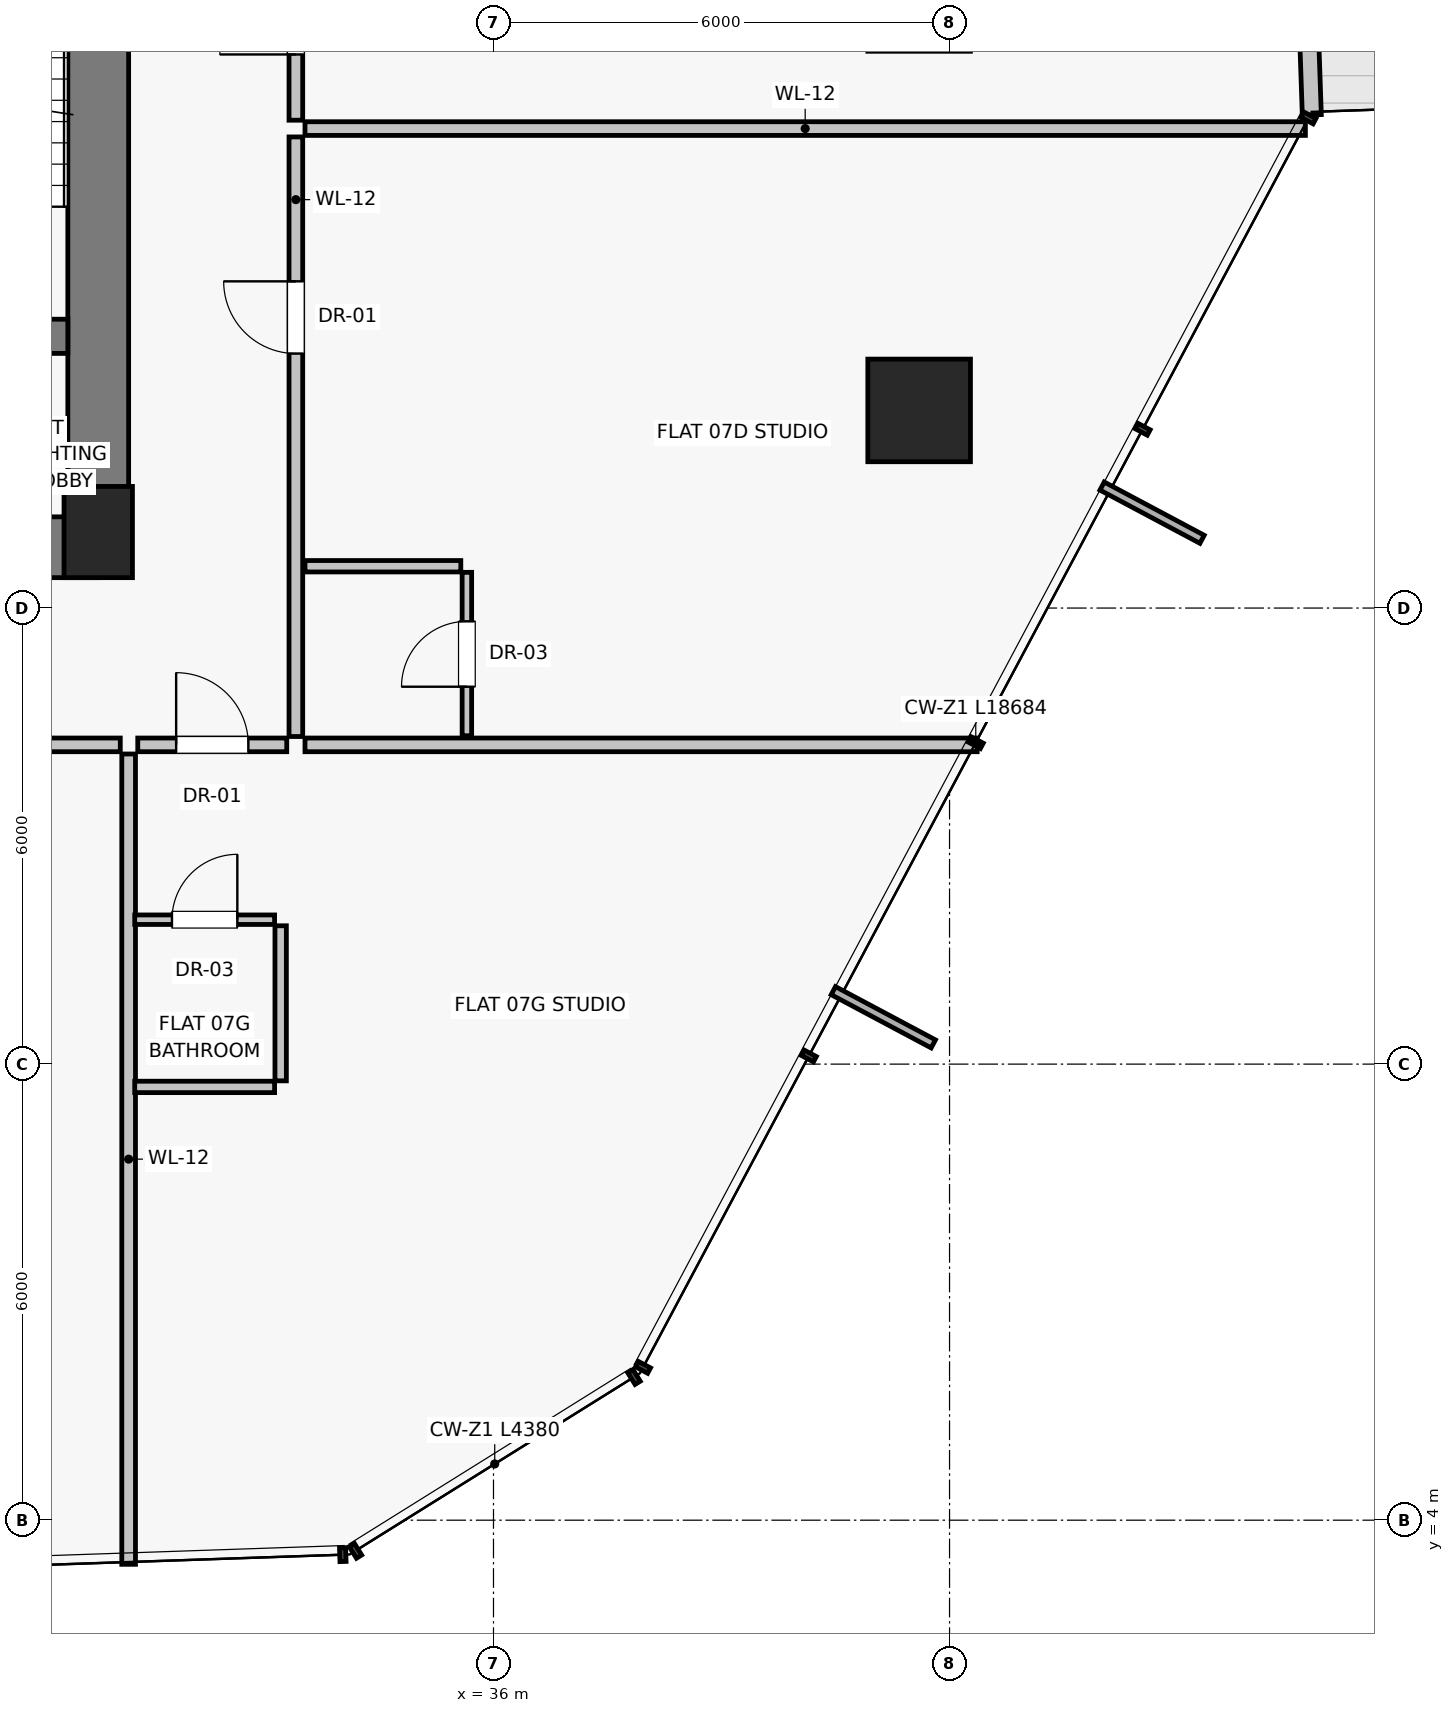
"""IFC4 building model, lengths in metres.
Left out: names, types, materials, properties, quantities, classifications, styles, units other than length and angle.
Written with IfcOpenShell. Run it as: python <this file> out.ifc"""

import sys

from ifc_helpers import new_model, si_unit, direction, frame, frame_2d, origin, origin_2d, place, context, subcontext, project, spatial, rectangle, extrude, source, transform, mapped, element, fill, save


model = new_model("IFC4")
c1 = context("Model", 3, precision=1e-05, world=origin(), true_north=direction((0.0, 1.0)))
c2 = subcontext(c1, "Body", "Model", "MODEL_VIEW")
j1 = project(units=[si_unit("LENGTHUNIT", "METRE"), si_unit("PLANEANGLEUNIT", "RADIAN")], contexts=[c1])
p1 = place(None, origin())
s1 = spatial("IfcSite", under=j1, at=p1, CompositionType="ELEMENT")
p2 = place(p1, origin())
s2 = spatial("IfcBuilding", under=s1, at=p2, CompositionType="ELEMENT")
p3 = place(p2, frame((0.0, 0.0, 30.55)))
s3 = spatial("IfcBuildingStorey", under=s2, at=p3, CompositionType="ELEMENT", Elevation=30.55)
p4 = place(p3, frame((30.8, 17.0, 0.0), z_axis=(0.0, 0.0, 1.0), x_axis=(1.0, 0.0, 0.0)))
e1 = element("IfcColumn", 1, at=p4, inside=s3, PredefinedType="PILASTER", context=c2, shape_type="SweptSolid", body=[
    extrude(rectangle(XDim=0.9, YDim=1.2, at=origin_2d()), origin(), (0.0, 0.0, 1.0), 3.25),
])
p5 = place(p3, frame((41.6, 18.6, 0.0), z_axis=(0.0, 0.0, 1.0), x_axis=(1.0, 0.0, 0.0)))
e2 = element("IfcColumn", 2, at=p5, inside=s3, PredefinedType="COLUMN", context=c2, shape_type="SweptSolid", body=[
    extrude(rectangle(XDim=1.35, YDim=1.35, at=origin_2d()), origin(), (0.0, 0.0, 1.0), 3.25),
])
p6 = place(p3, frame((46.766, 22.488, 0.0), z_axis=(0.0, 0.0, 1.0), x_axis=(-0.03422176955, 0.999414263701, 0.0)))
e3 = element("IfcWall", 3, at=p6, inside=s3, PredefinedType="SOLIDWALL", context=c2, shape_type="SweptSolid", body=[
    extrude(rectangle(XDim=4.58, YDim=0.25, at=frame_2d((2.29, 0.0))), origin(), (0.0, 0.0, 1.0), 3.0),
])
p7 = place(p6, frame((0.91, 0.0, 0.0)))
e4 = element("IfcOpeningElement", 4, at=p7, cuts=e3, PredefinedType="OPENING", context=c2, shape_type="SweptSolid", body=[
    extrude(rectangle(XDim=1.15, YDim=2.25, at=frame_2d((0.575, 1.125))), frame((0.0, 0.135, 0.0), z_axis=(0.0, -1.0, 0.0), x_axis=(1.0, 0.0, 0.0)), (0.0, 0.0, 1.0), 0.27),
])
p8 = place(p3, frame((30.8, 16.8, 0.0), z_axis=(0.0, 0.0, 1.0), x_axis=(0.0, 1.0, 0.0)))
e5 = element("IfcWall", 5, at=p8, inside=s3, PredefinedType="SHEAR", context=c2, shape_type="SweptSolid", body=[
    extrude(rectangle(XDim=14.2, YDim=0.8, at=frame_2d((7.1, 0.0))), origin(), (0.0, 0.0, 1.0), 3.0),
])
p9 = place(p3, frame((24.95, 16.8, 0.0), z_axis=(0.0, 0.0, 1.0), x_axis=(1.0, 0.0, 0.0)))
e6 = element("IfcWall", 6, at=p9, inside=s3, PredefinedType="SHEAR", context=c2, shape_type="SweptSolid", body=[
    extrude(rectangle(XDim=5.85, YDim=0.8, at=frame_2d((2.925, 0.0))), origin(), (0.0, 0.0, 1.0), 3.0),
])
p10 = place(p9, frame((2.15, 0.0, 0.0)))
e7 = element("IfcOpeningElement", 7, at=p10, cuts=e6, PredefinedType="OPENING", context=c2, shape_type="SweptSolid", body=[
    extrude(rectangle(XDim=1.2, YDim=2.03, at=frame_2d((0.6, 1.015))), frame((0.0, 0.41, 0.0), z_axis=(0.0, -1.0, 0.0), x_axis=(1.0, 0.0, 0.0)), (0.0, 0.0, 1.0), 0.82),
])
p11 = place(p3, frame((26.975, 19.575, 0.0), z_axis=(0.0, 0.0, 1.0), x_axis=(1.0, 0.0, 0.0)))
e8 = element("IfcWall", 8, at=p11, inside=s3, PredefinedType="SHEAR", context=c2, shape_type="SweptSolid", body=[
    extrude(rectangle(XDim=3.425, YDim=0.45, at=frame_2d((1.712, 0.0))), origin(), (0.0, 0.0, 1.0), 3.0),
])
p12 = place(p11, frame((1.05, 0.0, 0.0)))
e9 = element("IfcOpeningElement", 9, at=p12, cuts=e8, PredefinedType="OPENING", context=c2, shape_type="SweptSolid", body=[
    extrude(rectangle(XDim=1.1, YDim=2.03, at=frame_2d((0.55, 1.015))), frame((0.0, 0.235, 0.0), z_axis=(0.0, -1.0, 0.0), x_axis=(1.0, 0.0, 0.0)), (0.0, 0.0, 1.0), 0.47),
])
p13 = place(p3, frame((31.2, 14.08, 0.0), z_axis=(0.0, 0.0, 1.0), x_axis=(0.0, -1.0, 0.0)))
e10 = element("IfcWall", 10, at=p13, inside=s3, PredefinedType="PARTITIONING", context=c2, shape_type="SweptSolid", body=[
    extrude(rectangle(XDim=10.66, YDim=0.18, at=frame_2d((5.33, 0.0))), origin(), (0.0, 0.0, 1.0), 3.0),
])
p14 = place(p3, frame((25.118, 14.2, 0.0), z_axis=(0.0, 0.0, 1.0), x_axis=(1.0, 0.0, 0.0)))
e11 = element("IfcWall", 11, at=p14, inside=s3, PredefinedType="PARTITIONING", context=c2, shape_type="SweptSolid", body=[
    extrude(rectangle(XDim=5.972, YDim=0.18, at=frame_2d((2.986, 0.0))), origin(), (0.0, 0.0, 1.0), 3.0),
])
p15 = place(p14, frame((3.62, 0.0, 0.0)))
e12 = element("IfcOpeningElement", 12, at=p15, cuts=e11, PredefinedType="OPENING", context=c2, shape_type="SweptSolid", body=[
    extrude(rectangle(XDim=0.95, YDim=2.02, at=frame_2d((0.475, 1.01))), frame((0.0, 0.1, 0.0), z_axis=(0.0, -1.0, 0.0), x_axis=(1.0, 0.0, 0.0)), (0.0, 0.0, 1.0), 0.2),
])
p16 = place(p3, frame((33.52, 14.2, 0.0), z_axis=(0.0, 0.0, 1.0), x_axis=(1.0, 0.0, 0.0)))
e13 = element("IfcWall", 13, at=p16, inside=s3, PredefinedType="PARTITIONING", context=c2, shape_type="SweptSolid", body=[
    extrude(rectangle(XDim=8.843, YDim=0.18, at=frame_2d((4.422, 0.0))), origin(), (0.0, 0.0, 1.0), 3.0),
])
p17 = place(p3, frame((33.4, 22.418, 0.0), z_axis=(0.0, 0.0, 1.0), x_axis=(0.0, 1.0, 0.0)))
e14 = element("IfcWall", 14, at=p17, inside=s3, PredefinedType="PARTITIONING", context=c2, shape_type="SweptSolid", body=[
    extrude(rectangle(XDim=2.73, YDim=0.18, at=frame_2d((1.365, 0.0))), origin(), (0.0, 0.0, 1.0), 3.0),
])
p18 = place(p17, frame((0.865, 0.0, 0.0)))
e15 = element("IfcOpeningElement", 15, at=p18, cuts=e14, PredefinedType="OPENING", context=c2, shape_type="SweptSolid", body=[
    extrude(rectangle(XDim=1.0, YDim=2.01, at=frame_2d((0.5, 1.005))), frame((0.0, 0.1, 0.0), z_axis=(0.0, -1.0, 0.0), x_axis=(1.0, 0.0, 0.0)), (0.0, 0.0, 1.0), 0.2),
])
p19 = place(p3, frame((33.52, 22.308, 0.0), z_axis=(0.0, 0.0, 1.0), x_axis=(1.0, 0.0, 0.0)))
e16 = element("IfcWall", 16, at=p19, inside=s3, PredefinedType="PARTITIONING", context=c2, shape_type="SweptSolid", body=[
    extrude(rectangle(XDim=13.162, YDim=0.18, at=frame_2d((6.581, 0.0))), origin(), (0.0, 0.0, 1.0), 3.0),
])
p20 = place(p3, frame((33.4, 14.31, 0.0), z_axis=(0.0, 0.0, 1.0), x_axis=(0.0, 1.0, 0.0)))
e17 = element("IfcWall", 17, at=p20, inside=s3, PredefinedType="PARTITIONING", context=c2, shape_type="SweptSolid", body=[
    extrude(rectangle(XDim=7.888, YDim=0.18, at=frame_2d((3.944, 0.0))), origin(), (0.0, 0.0, 1.0), 3.0),
])
p21 = place(p20, frame((5.038, 0.0, 0.0)))
e18 = element("IfcOpeningElement", 18, at=p21, cuts=e17, PredefinedType="OPENING", context=c2, shape_type="SweptSolid", body=[
    extrude(rectangle(XDim=0.95, YDim=2.02, at=frame_2d((0.475, 1.01))), frame((0.0, 0.1, 0.0), z_axis=(0.0, -1.0, 0.0), x_axis=(1.0, 0.0, 0.0)), (0.0, 0.0, 1.0), 0.2),
])
p22 = place(p3, frame((33.52, 16.55, 0.0), z_axis=(0.0, 0.0, 1.0), x_axis=(1.0, 0.0, 0.0)))
e19 = element("IfcWall", 19, at=p22, inside=s3, PredefinedType="PARTITIONING", context=c2, shape_type="SweptSolid", body=[
    extrude(rectangle(XDim=2.05, YDim=0.15, at=frame_2d((1.025, 0.0))), origin(), (0.0, 0.0, 1.0), 3.0),
])
p23 = place(p3, frame((35.65, 14.32, 0.0), z_axis=(0.0, 0.0, 1.0), x_axis=(0.0, 1.0, 0.0)))
e20 = element("IfcWall", 20, at=p23, inside=s3, PredefinedType="PARTITIONING", context=c2, shape_type="SweptSolid", body=[
    extrude(rectangle(XDim=2.15, YDim=0.125, at=frame_2d((1.075, 0.0))), origin(), (0.0, 0.0, 1.0), 3.0),
])
p24 = place(p23, frame((0.645, 0.0, 0.0)))
e21 = element("IfcOpeningElement", 21, at=p24, cuts=e20, PredefinedType="OPENING", context=c2, shape_type="SweptSolid", body=[
    extrude(rectangle(XDim=0.86, YDim=2.01, at=frame_2d((0.43, 1.005))), frame((0.0, 0.073, 0.0), z_axis=(0.0, -1.0, 0.0), x_axis=(1.0, 0.0, 0.0)), (0.0, 0.0, 1.0), 0.145),
])
p25 = place(p3, frame((31.32, 14.2, 0.0), z_axis=(0.0, 0.0, 1.0), x_axis=(1.0, 0.0, 0.0)))
e22 = element("IfcWall", 22, at=p25, inside=s3, PredefinedType="PARTITIONING", context=c2, shape_type="SweptSolid", body=[
    extrude(rectangle(XDim=1.96, YDim=0.18, at=frame_2d((0.98, 0.0))), origin(), (0.0, 0.0, 1.0), 3.0),
])
p26 = place(p25, frame((0.505, 0.0, 0.0)))
e23 = element("IfcOpeningElement", 23, at=p26, cuts=e22, PredefinedType="OPENING", context=c2, shape_type="SweptSolid", body=[
    extrude(rectangle(XDim=0.95, YDim=2.02, at=frame_2d((0.475, 1.01))), frame((0.0, 0.1, 0.0), z_axis=(0.0, -1.0, 0.0), x_axis=(1.0, 0.0, 0.0)), (0.0, 0.0, 1.0), 0.2),
])
p27 = place(p3, frame((31.28, 11.9, 0.0), z_axis=(0.0, 0.0, 1.0), x_axis=(1.0, 0.0, 0.0)))
e24 = element("IfcWall", 24, at=p27, inside=s3, PredefinedType="PARTITIONING", context=c2, shape_type="SweptSolid", body=[
    extrude(rectangle(XDim=1.84, YDim=0.125, at=frame_2d((0.92, 0.0))), origin(), (0.0, 0.0, 1.0), 3.0),
])
p28 = place(p27, frame((0.49, 0.0, 0.0)))
e25 = element("IfcOpeningElement", 25, at=p28, cuts=e24, PredefinedType="OPENING", context=c2, shape_type="SweptSolid", body=[
    extrude(rectangle(XDim=0.86, YDim=2.01, at=frame_2d((0.43, 1.005))), frame((0.0, 0.073, 0.0), z_axis=(0.0, -1.0, 0.0), x_axis=(1.0, 0.0, 0.0)), (0.0, 0.0, 1.0), 0.145),
])
p29 = place(p3, frame((31.28, 9.7, 0.0), z_axis=(0.0, 0.0, 1.0), x_axis=(1.0, 0.0, 0.0)))
e26 = element("IfcWall", 26, at=p29, inside=s3, PredefinedType="PARTITIONING", context=c2, shape_type="SweptSolid", body=[
    extrude(rectangle(XDim=1.84, YDim=0.15, at=frame_2d((0.92, 0.0))), origin(), (0.0, 0.0, 1.0), 3.0),
])
p30 = place(p3, frame((33.2, 9.78, 0.0), z_axis=(0.0, 0.0, 1.0), x_axis=(0.0, 1.0, 0.0)))
e27 = element("IfcWall", 27, at=p30, inside=s3, PredefinedType="PARTITIONING", context=c2, shape_type="SweptSolid", body=[
    extrude(rectangle(XDim=2.04, YDim=0.15, at=frame_2d((1.02, 0.0))), origin(), (0.0, 0.0, 1.0), 3.0),
])
m1 = source(origin(), c2, "Body", "SweptSolid", [
    extrude(rectangle(XDim=1.0, YDim=2.01, at=frame_2d((0.5, 1.005))), frame((0.0, 0.025, 0.0), z_axis=(0.0, -1.0, 0.0), x_axis=(1.0, 0.0, 0.0)), (0.0, 0.0, 1.0), 0.05),
])
p31 = place(p18, origin())
e28 = element("IfcDoor", 28, at=p31, inside=s3, OperationType="SINGLE_SWING_LEFT", PredefinedType="DOOR", context=c2, shape_type="MappedRepresentation", body=[
    mapped(m1, transform((0.0, 0.0, 0.0), scale=1.0)),
])
fill(e15, e28)
m2 = source(origin(), c2, "Body", "SweptSolid", [
    extrude(rectangle(XDim=0.95, YDim=2.02, at=frame_2d((0.475, 1.01))), frame((0.0, 0.025, 0.0), z_axis=(0.0, -1.0, 0.0), x_axis=(1.0, 0.0, 0.0)), (0.0, 0.0, 1.0), 0.05),
])
p32 = place(p21, origin())
e29 = element("IfcDoor", 29, at=p32, inside=s3, OperationType="SINGLE_SWING_RIGHT", PredefinedType="DOOR", context=c2, shape_type="MappedRepresentation", body=[
    mapped(m2, transform((0.0, 0.0, 0.0), scale=1.0)),
])
fill(e18, e29)
m3 = source(origin(), c2, "Body", "SweptSolid", [
    extrude(rectangle(XDim=0.86, YDim=2.01, at=frame_2d((0.43, 1.005))), frame((0.0, 0.025, 0.0), z_axis=(0.0, -1.0, 0.0), x_axis=(1.0, 0.0, 0.0)), (0.0, 0.0, 1.0), 0.05),
])
p33 = place(p24, origin())
e30 = element("IfcDoor", 30, at=p33, inside=s3, OperationType="SINGLE_SWING_LEFT", PredefinedType="DOOR", context=c2, shape_type="MappedRepresentation", body=[
    mapped(m3, transform((0.0, 0.0, 0.0), scale=1.0)),
])
fill(e21, e30)
p34 = place(p26, origin())
e31 = element("IfcDoor", 31, at=p34, inside=s3, OperationType="SINGLE_SWING_LEFT", PredefinedType="DOOR", context=c2, shape_type="MappedRepresentation", body=[
    mapped(m2, transform((0.0, 0.0, 0.0), scale=1.0)),
])
fill(e23, e31)
p35 = place(p28, origin())
e32 = element("IfcDoor", 32, at=p35, inside=s3, OperationType="SINGLE_SWING_RIGHT", PredefinedType="DOOR", context=c2, shape_type="MappedRepresentation", body=[
    mapped(m3, transform((0.0, 0.0, 0.0), scale=1.0)),
])
fill(e25, e32)
save(model, sys.argv[1])
